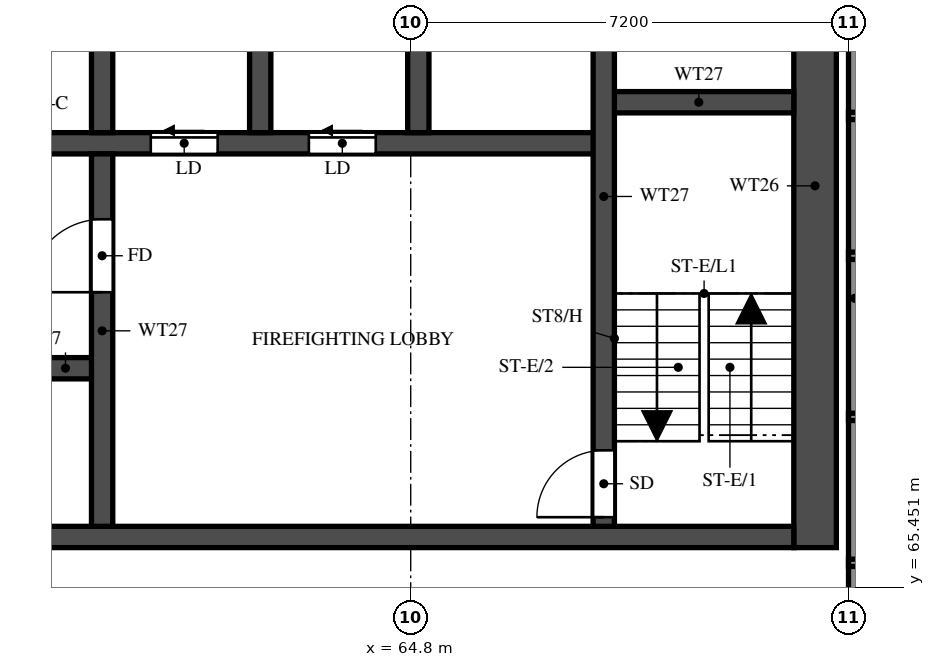
"""IFC4 building model, lengths in metres.
Left out: names, types, materials, properties, quantities, classifications, styles, units other than length and angle.
Written with IfcOpenShell. Run it as: python <this file> out.ifc"""

import sys

from ifc_helpers import new_model, si_unit, direction, frame, frame_2d, origin, place, context, subcontext, project, spatial, rectangle, extrude, element, fill, save


model = new_model("IFC4")
c1 = context("Model", 3, precision=1e-05, world=origin(), true_north=direction((0.0, 1.0)))
c2 = subcontext(c1, "Body", "Model", "MODEL_VIEW")
j1 = project(units=[si_unit("LENGTHUNIT", "METRE"), si_unit("PLANEANGLEUNIT", "RADIAN")], contexts=[c1])
p1 = place(None, origin())
s1 = spatial("IfcSite", under=j1, at=p1, CompositionType="ELEMENT")
p2 = place(p1, origin())
s2 = spatial("IfcBuilding", under=s1, at=p2, CompositionType="ELEMENT")
p3 = place(p2, frame((0.0, 0.0, 143.0)))
s3 = spatial("IfcBuildingStorey", under=s2, at=p3, CompositionType="ELEMENT", Elevation=143.0)
p4 = place(p3, frame((71.45, 66.1, 0.0), z_axis=(0.0, 0.0, 1.0), x_axis=(0.0, 1.0, 0.0)))
e1 = element("IfcWall", 1, at=p4, inside=s3, PredefinedType="SHEAR", context=c2, shape_type="SweptSolid", body=[
    extrude(rectangle(XDim=11.9, YDim=0.7, at=frame_2d((5.95, 0.0))), origin(), (0.0, 0.0, 1.0), 3.2),
])
p5 = place(p3, frame((29.7, 66.275, 0.0), z_axis=(0.0, 0.0, 1.0), x_axis=(1.0, 0.0, 0.0)))
e2 = element("IfcWall", 2, at=p5, inside=s3, PredefinedType="SHEAR", context=c2, shape_type="SweptSolid", body=[
    extrude(rectangle(XDim=41.4, YDim=0.35, at=frame_2d((20.7, 0.0))), origin(), (0.0, 0.0, 1.0), 3.2),
])
p6 = place(p5, frame((0.925, 0.0, 0.0)))
e3 = element("IfcOpeningElement", 3, at=p6, cuts=e2, PredefinedType="OPENING", context=c2, shape_type="SweptSolid", body=[
    extrude(rectangle(XDim=1.1, YDim=2.1, at=frame_2d((0.55, 1.05))), frame((0.0, 0.185, 0.0), z_axis=(0.0, -1.0, 0.0), x_axis=(1.0, 0.0, 0.0)), (0.0, 0.0, 1.0), 0.37),
])
p7 = place(p5, frame((3.712, 0.0, 0.0)))
e4 = element("IfcOpeningElement", 4, at=p7, cuts=e2, PredefinedType="OPENING", context=c2, shape_type="SweptSolid", body=[
    extrude(rectangle(XDim=1.8, YDim=2.1, at=frame_2d((0.9, 1.05))), frame((0.0, 0.185, 0.0), z_axis=(0.0, -1.0, 0.0), x_axis=(1.0, 0.0, 0.0)), (0.0, 0.0, 1.0), 0.37),
])
p8 = place(p3, frame((35.625, 69.05, 0.0), z_axis=(0.0, 0.0, 1.0), x_axis=(1.0, 0.0, 0.0)))
e5 = element("IfcWall", 5, at=p8, inside=s3, PredefinedType="SHEAR", context=c2, shape_type="SweptSolid", body=[
    extrude(rectangle(XDim=24.1, YDim=0.35, at=frame_2d((12.05, 0.0))), origin(), (0.0, 0.0, 1.0), 3.2),
])
p9 = place(p8, frame((1.0, 0.0, 0.0)))
e6 = element("IfcOpeningElement", 6, at=p9, cuts=e5, PredefinedType="OPENING", context=c2, shape_type="SweptSolid", body=[
    extrude(rectangle(XDim=1.1, YDim=2.1, at=frame_2d((0.55, 1.05))), frame((0.0, 0.185, 0.0), z_axis=(0.0, -1.0, 0.0), x_axis=(1.0, 0.0, 0.0)), (0.0, 0.0, 1.0), 0.37),
])
p10 = place(p8, frame((3.75, 0.0, 0.0)))
e7 = element("IfcOpeningElement", 7, at=p10, cuts=e5, PredefinedType="OPENING", context=c2, shape_type="SweptSolid", body=[
    extrude(rectangle(XDim=1.1, YDim=2.1, at=frame_2d((0.55, 1.05))), frame((0.0, 0.185, 0.0), z_axis=(0.0, -1.0, 0.0), x_axis=(1.0, 0.0, 0.0)), (0.0, 0.0, 1.0), 0.37),
])
p11 = place(p8, frame((6.5, 0.0, 0.0)))
e8 = element("IfcOpeningElement", 8, at=p11, cuts=e5, PredefinedType="OPENING", context=c2, shape_type="SweptSolid", body=[
    extrude(rectangle(XDim=1.1, YDim=2.1, at=frame_2d((0.55, 1.05))), frame((0.0, 0.185, 0.0), z_axis=(0.0, -1.0, 0.0), x_axis=(1.0, 0.0, 0.0)), (0.0, 0.0, 1.0), 0.37),
])
p12 = place(p8, frame((9.25, 0.0, 0.0)))
e9 = element("IfcOpeningElement", 9, at=p12, cuts=e5, PredefinedType="OPENING", context=c2, shape_type="SweptSolid", body=[
    extrude(rectangle(XDim=1.1, YDim=2.1, at=frame_2d((0.55, 1.05))), frame((0.0, 0.185, 0.0), z_axis=(0.0, -1.0, 0.0), x_axis=(1.0, 0.0, 0.0)), (0.0, 0.0, 1.0), 0.37),
])
p13 = place(p8, frame((12.0, 0.0, 0.0)))
e10 = element("IfcOpeningElement", 10, at=p13, cuts=e5, PredefinedType="OPENING", context=c2, shape_type="SweptSolid", body=[
    extrude(rectangle(XDim=1.1, YDim=2.1, at=frame_2d((0.55, 1.05))), frame((0.0, 0.185, 0.0), z_axis=(0.0, -1.0, 0.0), x_axis=(1.0, 0.0, 0.0)), (0.0, 0.0, 1.0), 0.37),
])
p14 = place(p8, frame((14.75, 0.0, 0.0)))
e11 = element("IfcOpeningElement", 11, at=p14, cuts=e5, PredefinedType="OPENING", context=c2, shape_type="SweptSolid", body=[
    extrude(rectangle(XDim=1.1, YDim=2.1, at=frame_2d((0.55, 1.05))), frame((0.0, 0.185, 0.0), z_axis=(0.0, -1.0, 0.0), x_axis=(1.0, 0.0, 0.0)), (0.0, 0.0, 1.0), 0.37),
])
p15 = place(p8, frame((17.625, 0.0, 0.0)))
e12 = element("IfcOpeningElement", 12, at=p15, cuts=e5, PredefinedType="OPENING", context=c2, shape_type="SweptSolid", body=[
    extrude(rectangle(XDim=1.1, YDim=2.1, at=frame_2d((0.55, 1.05))), frame((0.0, 0.185, 0.0), z_axis=(0.0, -1.0, 0.0), x_axis=(1.0, 0.0, 0.0)), (0.0, 0.0, 1.0), 0.37),
])
p16 = place(p8, frame((20.625, 0.0, 0.0)))
e13 = element("IfcOpeningElement", 13, at=p16, cuts=e5, PredefinedType="OPENING", context=c2, shape_type="SweptSolid", body=[
    extrude(rectangle(XDim=1.1, YDim=2.1, at=frame_2d((0.55, 1.05))), frame((0.0, 0.185, 0.0), z_axis=(0.0, -1.0, 0.0), x_axis=(1.0, 0.0, 0.0)), (0.0, 0.0, 1.0), 0.37),
])
p17 = place(p3, frame((32.825, 72.75, 0.0), z_axis=(0.0, 0.0, 1.0), x_axis=(1.0, 0.0, 0.0)))
e14 = element("IfcWall", 14, at=p17, inside=s3, PredefinedType="SHEAR", context=c2, shape_type="SweptSolid", body=[
    extrude(rectangle(XDim=35.15, YDim=0.35, at=frame_2d((17.575, 0.0))), origin(), (0.0, 0.0, 1.0), 3.2),
])
p18 = place(p17, frame((19.8, 0.0, 0.0)))
e15 = element("IfcOpeningElement", 15, at=p18, cuts=e14, PredefinedType="OPENING", context=c2, shape_type="SweptSolid", body=[
    extrude(rectangle(XDim=1.1, YDim=2.1, at=frame_2d((0.55, 1.05))), frame((0.0, 0.185, 0.0), z_axis=(0.0, -1.0, 0.0), x_axis=(1.0, 0.0, 0.0)), (0.0, 0.0, 1.0), 0.37),
])
p19 = place(p17, frame((27.7, 0.0, 0.0)))
e16 = element("IfcOpeningElement", 16, at=p19, cuts=e14, PredefinedType="OPENING", context=c2, shape_type="SweptSolid", body=[
    extrude(rectangle(XDim=1.1, YDim=2.1, at=frame_2d((0.55, 1.05))), frame((0.0, 0.185, 0.0), z_axis=(0.0, -1.0, 0.0), x_axis=(1.0, 0.0, 0.0)), (0.0, 0.0, 1.0), 0.37),
])
p20 = place(p17, frame((30.3, 0.0, 0.0)))
e17 = element("IfcOpeningElement", 17, at=p20, cuts=e14, PredefinedType="OPENING", context=c2, shape_type="SweptSolid", body=[
    extrude(rectangle(XDim=1.1, YDim=2.1, at=frame_2d((0.55, 1.05))), frame((0.0, 0.185, 0.0), z_axis=(0.0, -1.0, 0.0), x_axis=(1.0, 0.0, 0.0)), (0.0, 0.0, 1.0), 0.37),
])
p21 = place(p17, frame((3.8, 0.0, 0.0)))
e18 = element("IfcOpeningElement", 18, at=p21, cuts=e14, PredefinedType="OPENING", context=c2, shape_type="SweptSolid", body=[
    extrude(rectangle(XDim=1.1, YDim=2.1, at=frame_2d((0.55, 1.05))), frame((0.0, 0.185, 0.0), z_axis=(0.0, -1.0, 0.0), x_axis=(1.0, 0.0, 0.0)), (0.0, 0.0, 1.0), 0.37),
])
p22 = place(p17, frame((6.55, 0.0, 0.0)))
e19 = element("IfcOpeningElement", 19, at=p22, cuts=e14, PredefinedType="OPENING", context=c2, shape_type="SweptSolid", body=[
    extrude(rectangle(XDim=1.1, YDim=2.1, at=frame_2d((0.55, 1.05))), frame((0.0, 0.185, 0.0), z_axis=(0.0, -1.0, 0.0), x_axis=(1.0, 0.0, 0.0)), (0.0, 0.0, 1.0), 0.37),
])
p23 = place(p17, frame((9.3, 0.0, 0.0)))
e20 = element("IfcOpeningElement", 20, at=p23, cuts=e14, PredefinedType="OPENING", context=c2, shape_type="SweptSolid", body=[
    extrude(rectangle(XDim=1.1, YDim=2.1, at=frame_2d((0.55, 1.05))), frame((0.0, 0.185, 0.0), z_axis=(0.0, -1.0, 0.0), x_axis=(1.0, 0.0, 0.0)), (0.0, 0.0, 1.0), 0.37),
])
p24 = place(p17, frame((12.05, 0.0, 0.0)))
e21 = element("IfcOpeningElement", 21, at=p24, cuts=e14, PredefinedType="OPENING", context=c2, shape_type="SweptSolid", body=[
    extrude(rectangle(XDim=1.1, YDim=2.1, at=frame_2d((0.55, 1.05))), frame((0.0, 0.185, 0.0), z_axis=(0.0, -1.0, 0.0), x_axis=(1.0, 0.0, 0.0)), (0.0, 0.0, 1.0), 0.37),
])
p25 = place(p17, frame((14.8, 0.0, 0.0)))
e22 = element("IfcOpeningElement", 22, at=p25, cuts=e14, PredefinedType="OPENING", context=c2, shape_type="SweptSolid", body=[
    extrude(rectangle(XDim=1.1, YDim=2.1, at=frame_2d((0.55, 1.05))), frame((0.0, 0.185, 0.0), z_axis=(0.0, -1.0, 0.0), x_axis=(1.0, 0.0, 0.0)), (0.0, 0.0, 1.0), 0.37),
])
p26 = place(p17, frame((17.55, 0.0, 0.0)))
e23 = element("IfcOpeningElement", 23, at=p26, cuts=e14, PredefinedType="OPENING", context=c2, shape_type="SweptSolid", body=[
    extrude(rectangle(XDim=1.1, YDim=2.1, at=frame_2d((0.55, 1.05))), frame((0.0, 0.185, 0.0), z_axis=(0.0, -1.0, 0.0), x_axis=(1.0, 0.0, 0.0)), (0.0, 0.0, 1.0), 0.37),
])
p27 = place(p17, frame((0.938, 0.0, 0.0)))
e24 = element("IfcOpeningElement", 24, at=p27, cuts=e14, PredefinedType="OPENING", context=c2, shape_type="SweptSolid", body=[
    extrude(rectangle(XDim=1.1, YDim=2.1, at=frame_2d((0.55, 1.05))), frame((0.0, 0.185, 0.0), z_axis=(0.0, -1.0, 0.0), x_axis=(1.0, 0.0, 0.0)), (0.0, 0.0, 1.0), 0.37),
])
p28 = place(p3, frame((67.975, 73.425, 0.0), z_axis=(0.0, 0.0, 1.0), x_axis=(1.0, 0.0, 0.0)))
e25 = element("IfcWall", 25, at=p28, inside=s3, PredefinedType="SHEAR", context=c2, shape_type="SweptSolid", body=[
    extrude(rectangle(XDim=3.125, YDim=0.35, at=frame_2d((1.562, 0.0))), origin(), (0.0, 0.0, 1.0), 3.2),
])
p29 = place(p3, frame((67.975, 66.45, 0.0), z_axis=(0.0, 0.0, 1.0), x_axis=(0.0, 1.0, 0.0)))
e26 = element("IfcWall", 26, at=p29, inside=s3, PredefinedType="SHEAR", context=c2, shape_type="SweptSolid", body=[
    extrude(rectangle(XDim=10.85, YDim=0.35, at=frame_2d((5.425, 0.0))), origin(), (0.0, 0.0, 1.0), 3.2),
])
p30 = place(p29, frame((0.15, 0.0, 0.0)))
e27 = element("IfcOpeningElement", 27, at=p30, cuts=e26, PredefinedType="OPENING", context=c2, shape_type="SweptSolid", body=[
    extrude(rectangle(XDim=1.1, YDim=2.1, at=frame_2d((0.55, 1.05))), frame((0.0, 0.185, 0.0), z_axis=(0.0, -1.0, 0.0), x_axis=(1.0, 0.0, 0.0)), (0.0, 0.0, 1.0), 0.37),
])
p31 = place(p3, frame((59.725, 66.45, 0.0), z_axis=(0.0, 0.0, 1.0), x_axis=(0.0, 1.0, 0.0)))
e28 = element("IfcWall", 28, at=p31, inside=s3, PredefinedType="SHEAR", context=c2, shape_type="SweptSolid", body=[
    extrude(rectangle(XDim=6.125, YDim=0.35, at=frame_2d((3.062, 0.0))), origin(), (0.0, 0.0, 1.0), 3.2),
])
p32 = place(p31, frame((3.85, 0.0, 0.0)))
e29 = element("IfcOpeningElement", 29, at=p32, cuts=e28, PredefinedType="OPENING", context=c2, shape_type="SweptSolid", body=[
    extrude(rectangle(XDim=1.2, YDim=2.1, at=frame_2d((0.6, 1.05))), frame((0.0, 0.185, 0.0), z_axis=(0.0, -1.0, 0.0), x_axis=(1.0, 0.0, 0.0)), (0.0, 0.0, 1.0), 0.37),
])
for number, where, z_axis, x_axis in (
    (30, (59.725, 72.925, 0.0), (0.0, 0.0, 1.0), (0.0, 1.0, 0.0)),
    (31, (62.325, 72.925, 0.0), (0.0, 0.0, 1.0), (0.0, 1.0, 0.0)),
    (32, (64.925, 72.925, 0.0), (0.0, 0.0, 1.0), (0.0, 1.0, 0.0)),
):
    element("IfcWall", number, at=place(p3, frame(where, z_axis=z_axis, x_axis=x_axis)), inside=s3, PredefinedType="SHEAR", context=c2, shape_type="SweptSolid", body=[
        extrude(rectangle(XDim=2.95, YDim=0.35, at=frame_2d((1.475, 0.0))), origin(), (0.0, 0.0, 1.0), 3.2),
    ])
p33 = place(p3, frame((72.1, 62.4, 0.0), z_axis=(0.0, 0.0, 1.0), x_axis=(0.0, 1.0, 0.0)))
e33 = element("IfcWall", 33, at=p33, inside=s3, PredefinedType="SOLIDWALL", context=c2, shape_type="SweptSolid", body=[
    extrude(rectangle(XDim=15.6, YDim=0.2, at=frame_2d((7.8, 0.0))), origin(), (0.0, 0.0, 1.0), 3.2),
])
for number, where, z_axis, x_axis in (
    (34, (72.0, 65.85, 0.0), (0.0, 0.0, 1.0), (1.0, 0.0, 0.0)),
    (35, (72.0, 68.25, 0.0), (0.0, 0.0, 1.0), (1.0, 0.0, 0.0)),
    (36, (72.0, 70.9, 0.0), (0.0, 0.0, 1.0), (1.0, 0.0, 0.0)),
):
    element("IfcWall", number, at=place(p3, frame(where, z_axis=z_axis, x_axis=x_axis)), inside=s3, PredefinedType="PARTITIONING", context=c2, shape_type="SweptSolid", body=[
        extrude(rectangle(XDim=5.1, YDim=0.12, at=frame_2d((2.55, 0.0))), origin(), (0.0, 0.0, 1.0), 3.2),
    ])
p34 = place(p3, frame((72.0, 73.2, 0.0), z_axis=(0.0, 0.0, 1.0), x_axis=(1.0, 0.0, 0.0)))
e37 = element("IfcWall", 37, at=p34, inside=s3, PredefinedType="PARTITIONING", context=c2, shape_type="SweptSolid", body=[
    extrude(rectangle(XDim=14.275, YDim=0.12, at=frame_2d((7.137, 0.0))), origin(), (0.0, 0.0, 1.0), 2.3),
])
p35 = place(p34, frame((5.7, 0.0, 0.0)))
e38 = element("IfcOpeningElement", 38, at=p35, cuts=e37, PredefinedType="OPENING", context=c2, shape_type="SweptSolid", body=[
    extrude(rectangle(XDim=0.9, YDim=2.1, at=frame_2d((0.45, 1.05))), frame((0.0, 0.07, 0.0), z_axis=(0.0, -1.0, 0.0), x_axis=(1.0, 0.0, 0.0)), (0.0, 0.0, 1.0), 0.14),
])
p36 = place(p30, origin())
e39 = element("IfcDoor", 39, at=p36, inside=s3, OperationType="SINGLE_SWING_LEFT", PredefinedType="DOOR", context=c2, shape_type="SweptSolid", body=[
    extrude(rectangle(XDim=1.1, YDim=2.1, at=frame_2d((0.55, 1.05))), frame((0.0, 0.025, 0.0), z_axis=(0.0, -1.0, 0.0), x_axis=(1.0, 0.0, 0.0)), (0.0, 0.0, 1.0), 0.05),
])
fill(e27, e39)
p37 = place(p32, origin())
e40 = element("IfcDoor", 40, at=p37, inside=s3, OperationType="SINGLE_SWING_LEFT", PredefinedType="DOOR", context=c2, shape_type="SweptSolid", body=[
    extrude(rectangle(XDim=1.2, YDim=2.1, at=frame_2d((0.6, 1.05))), frame((0.0, 0.025, 0.0), z_axis=(0.0, -1.0, 0.0), x_axis=(1.0, 0.0, 0.0)), (0.0, 0.0, 1.0), 0.05),
])
fill(e29, e40)
p38 = place(p19, origin())
e41 = element("IfcDoor", 41, at=p38, inside=s3, OperationType="SLIDING_TO_LEFT", PredefinedType="DOOR", context=c2, shape_type="SweptSolid", body=[
    extrude(rectangle(XDim=1.1, YDim=2.1, at=frame_2d((0.55, 1.05))), frame((0.0, 0.025, 0.0), z_axis=(0.0, -1.0, 0.0), x_axis=(1.0, 0.0, 0.0)), (0.0, 0.0, 1.0), 0.05),
])
fill(e16, e41)
p39 = place(p20, origin())
e42 = element("IfcDoor", 42, at=p39, inside=s3, OperationType="SLIDING_TO_LEFT", PredefinedType="DOOR", context=c2, shape_type="SweptSolid", body=[
    extrude(rectangle(XDim=1.1, YDim=2.1, at=frame_2d((0.55, 1.05))), frame((0.0, 0.025, 0.0), z_axis=(0.0, -1.0, 0.0), x_axis=(1.0, 0.0, 0.0)), (0.0, 0.0, 1.0), 0.05),
])
fill(e17, e42)
save(model, sys.argv[1])
